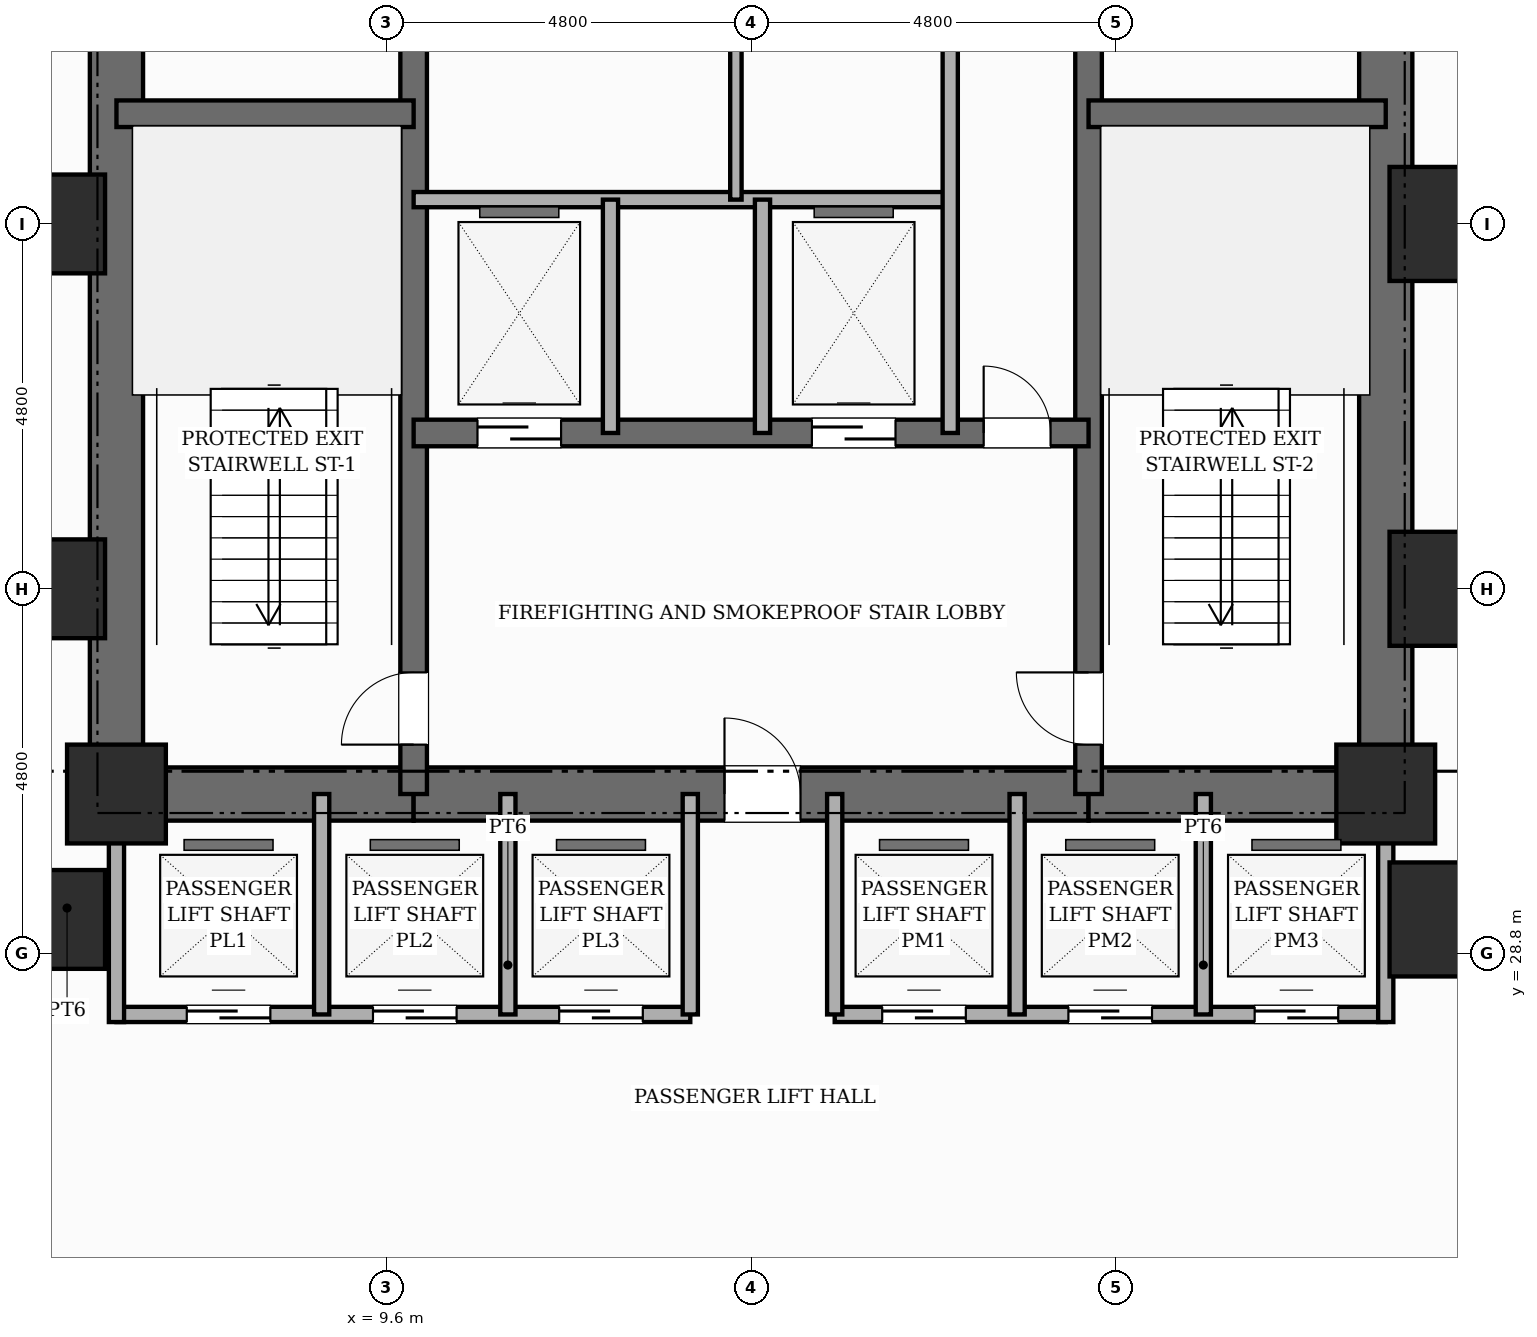
"""IFC4 building model, lengths in metres.
Left out: names, types, materials, properties, quantities, classifications, styles, units other than length and angle.
Written with IfcOpenShell. Run it as: python <this file> out.ifc"""

import sys

from ifc_helpers import new_model, si_unit, direction, frame, frame_2d, origin, origin_2d, place, context, subcontext, project, spatial, rectangle, extrude, element, fill, save


model = new_model("IFC4")
c1 = context("Model", 3, precision=1e-05, world=origin(), true_north=direction((0.0, 1.0)))
c2 = subcontext(c1, "Body", "Model", "MODEL_VIEW")
j1 = project(units=[si_unit("LENGTHUNIT", "METRE"), si_unit("PLANEANGLEUNIT", "RADIAN")], contexts=[c1])
p1 = place(None, origin())
s1 = spatial("IfcSite", under=j1, at=p1, CompositionType="ELEMENT")
p2 = place(p1, origin())
s2 = spatial("IfcBuilding", under=s1, at=p2, CompositionType="ELEMENT")
p3 = place(p2, frame((0.0, 0.0, -13.2)))
s3 = spatial("IfcBuildingStorey", under=s2, at=p3, CompositionType="ELEMENT", Elevation=-13.2)
p4 = place(p3, frame((6.05, 30.55, 0.0), z_axis=(0.0, 0.0, 1.0), x_axis=(0.0, 1.0, 0.0)))
e1 = element("IfcWall", 1, at=p4, inside=s3, PredefinedType="SHEAR", context=c2, shape_type="SweptSolid", body=[
    extrude(rectangle(XDim=15.6, YDim=0.7, at=frame_2d((7.8, 0.0))), origin(), (0.0, 0.0, 1.0), 4.4),
])
p5 = place(p3, frame((22.75, 30.55, 0.0), z_axis=(0.0, 0.0, 1.0), x_axis=(0.0, 1.0, 0.0)))
e2 = element("IfcWall", 2, at=p5, inside=s3, PredefinedType="SHEAR", context=c2, shape_type="SweptSolid", body=[
    extrude(rectangle(XDim=15.6, YDim=0.7, at=frame_2d((7.8, 0.0))), origin(), (0.0, 0.0, 1.0), 4.4),
])
p6 = place(p5, frame((10.8, 0.0, 0.0)))
e3 = element("IfcOpeningElement", 3, at=p6, cuts=e2, PredefinedType="OPENING", context=c2, shape_type="SweptSolid", body=[
    extrude(rectangle(XDim=1.0, YDim=2.15, at=frame_2d((0.5, 1.075))), frame((0.0, 0.36, 0.0), z_axis=(0.0, -1.0, 0.0), x_axis=(1.0, 0.0, 0.0)), (0.0, 0.0, 1.0), 0.72),
])
p7 = place(p3, frame((6.05, 30.9, 0.0), z_axis=(0.0, 0.0, 1.0), x_axis=(1.0, 0.0, 0.0)))
e4 = element("IfcWall", 4, at=p7, inside=s3, PredefinedType="SHEAR", context=c2, shape_type="SweptSolid", body=[
    extrude(rectangle(XDim=3.91, YDim=0.7, at=frame_2d((1.955, 0.0))), origin(), (0.0, 0.0, 1.0), 4.4),
])
p8 = place(p3, frame((9.96, 30.9, 0.0), z_axis=(0.0, 0.0, 1.0), x_axis=(1.0, 0.0, 0.0)))
e5 = element("IfcWall", 5, at=p8, inside=s3, PredefinedType="SHEAR", context=c2, shape_type="SweptSolid", body=[
    extrude(rectangle(XDim=8.88, YDim=0.7, at=frame_2d((4.44, 0.0))), origin(), (0.0, 0.0, 1.0), 4.4),
])
p9 = place(p8, frame((4.09, 0.0, 0.0)))
e6 = element("IfcOpeningElement", 6, at=p9, cuts=e5, PredefinedType="OPENING", context=c2, shape_type="SweptSolid", body=[
    extrude(rectangle(XDim=1.0, YDim=2.15, at=frame_2d((0.5, 1.075))), frame((0.0, 0.36, 0.0), z_axis=(0.0, -1.0, 0.0), x_axis=(1.0, 0.0, 0.0)), (0.0, 0.0, 1.0), 0.72),
])
p10 = place(p3, frame((18.84, 30.9, 0.0), z_axis=(0.0, 0.0, 1.0), x_axis=(1.0, 0.0, 0.0)))
e7 = element("IfcWall", 7, at=p10, inside=s3, PredefinedType="SHEAR", context=c2, shape_type="SweptSolid", body=[
    extrude(rectangle(XDim=3.91, YDim=0.7, at=frame_2d((1.955, 0.0))), origin(), (0.0, 0.0, 1.0), 4.4),
])
p11 = place(p3, frame((9.96, 30.9, 0.0), z_axis=(0.0, 0.0, 1.0), x_axis=(0.0, 1.0, 0.0)))
e8 = element("IfcWall", 8, at=p11, inside=s3, PredefinedType="SHEAR", context=c2, shape_type="SweptSolid", body=[
    extrude(rectangle(XDim=14.9, YDim=0.35, at=frame_2d((7.45, 0.0))), origin(), (0.0, 0.0, 1.0), 4.4),
])
p12 = place(p11, frame((0.65, 0.0, 0.0)))
e9 = element("IfcOpeningElement", 9, at=p12, cuts=e8, PredefinedType="OPENING", context=c2, shape_type="SweptSolid", body=[
    extrude(rectangle(XDim=0.95, YDim=2.1, at=frame_2d((0.475, 1.05))), frame((0.0, 0.185, 0.0), z_axis=(0.0, -1.0, 0.0), x_axis=(1.0, 0.0, 0.0)), (0.0, 0.0, 1.0), 0.37),
])
p13 = place(p11, frame((10.45, 0.0, 0.0)))
e10 = element("IfcOpeningElement", 10, at=p13, cuts=e8, PredefinedType="OPENING", context=c2, shape_type="SweptSolid", body=[
    extrude(rectangle(XDim=1.0, YDim=2.15, at=frame_2d((0.5, 1.075))), frame((0.0, 0.185, 0.0), z_axis=(0.0, -1.0, 0.0), x_axis=(1.0, 0.0, 0.0)), (0.0, 0.0, 1.0), 0.37),
])
p14 = place(p3, frame((18.84, 30.9, 0.0), z_axis=(0.0, 0.0, 1.0), x_axis=(0.0, 1.0, 0.0)))
e11 = element("IfcWall", 11, at=p14, inside=s3, PredefinedType="SHEAR", context=c2, shape_type="SweptSolid", body=[
    extrude(rectangle(XDim=14.9, YDim=0.35, at=frame_2d((7.45, 0.0))), origin(), (0.0, 0.0, 1.0), 4.4),
])
p15 = place(p14, frame((0.65, 0.0, 0.0)))
e12 = element("IfcOpeningElement", 12, at=p15, cuts=e11, PredefinedType="OPENING", context=c2, shape_type="SweptSolid", body=[
    extrude(rectangle(XDim=0.95, YDim=2.1, at=frame_2d((0.475, 1.05))), frame((0.0, 0.185, 0.0), z_axis=(0.0, -1.0, 0.0), x_axis=(1.0, 0.0, 0.0)), (0.0, 0.0, 1.0), 0.37),
])
p16 = place(p14, frame((10.45, 0.0, 0.0)))
e13 = element("IfcOpeningElement", 13, at=p16, cuts=e11, PredefinedType="OPENING", context=c2, shape_type="SweptSolid", body=[
    extrude(rectangle(XDim=1.0, YDim=2.15, at=frame_2d((0.5, 1.075))), frame((0.0, 0.185, 0.0), z_axis=(0.0, -1.0, 0.0), x_axis=(1.0, 0.0, 0.0)), (0.0, 0.0, 1.0), 0.37),
])
for number, where, z_axis, x_axis in (
    (14, (6.05, 39.85, 0.0), (0.0, 0.0, 1.0), (1.0, 0.0, 0.0)),
    (15, (18.84, 39.85, 0.0), (0.0, 0.0, 1.0), (1.0, 0.0, 0.0)),
):
    element("IfcWall", number, at=place(p3, frame(where, z_axis=z_axis, x_axis=x_axis)), inside=s3, PredefinedType="SHEAR", context=c2, shape_type="SweptSolid", body=[
        extrude(rectangle(XDim=3.91, YDim=0.35, at=frame_2d((1.955, 0.0))), origin(), (0.0, 0.0, 1.0), 4.4),
    ])
p17 = place(p3, frame((9.96, 35.65, 0.0), z_axis=(0.0, 0.0, 1.0), x_axis=(1.0, 0.0, 0.0)))
e16 = element("IfcWall", 16, at=p17, inside=s3, PredefinedType="SHEAR", context=c2, shape_type="SweptSolid", body=[
    extrude(rectangle(XDim=8.88, YDim=0.35, at=frame_2d((4.44, 0.0))), origin(), (0.0, 0.0, 1.0), 4.4),
])
p18 = place(p17, frame((0.84, 0.0, 0.0)))
e17 = element("IfcOpeningElement", 17, at=p18, cuts=e16, PredefinedType="OPENING", context=c2, shape_type="SweptSolid", body=[
    extrude(rectangle(XDim=1.1, YDim=2.15, at=frame_2d((0.55, 1.075))), frame((0.0, 0.185, 0.0), z_axis=(0.0, -1.0, 0.0), x_axis=(1.0, 0.0, 0.0)), (0.0, 0.0, 1.0), 0.37),
])
p19 = place(p17, frame((5.24, 0.0, 0.0)))
e18 = element("IfcOpeningElement", 18, at=p19, cuts=e16, PredefinedType="OPENING", context=c2, shape_type="SweptSolid", body=[
    extrude(rectangle(XDim=1.1, YDim=2.15, at=frame_2d((0.55, 1.075))), frame((0.0, 0.185, 0.0), z_axis=(0.0, -1.0, 0.0), x_axis=(1.0, 0.0, 0.0)), (0.0, 0.0, 1.0), 0.37),
])
p20 = place(p17, frame((7.5, 0.0, 0.0)))
e19 = element("IfcOpeningElement", 19, at=p20, cuts=e16, PredefinedType="OPENING", context=c2, shape_type="SweptSolid", body=[
    extrude(rectangle(XDim=0.88, YDim=2.1, at=frame_2d((0.44, 1.05))), frame((0.0, 0.185, 0.0), z_axis=(0.0, -1.0, 0.0), x_axis=(1.0, 0.0, 0.0)), (0.0, 0.0, 1.0), 0.37),
])
for number, where, z_axis, x_axis in (
    (20, (5.25, 29.25, 0.0), (0.0, 0.0, 1.0), (1.0, 0.0, 0.0)),
    (21, (5.25, 33.6, 0.0), (0.0, 0.0, 1.0), (1.0, 0.0, 0.0)),
    (22, (5.25, 38.4, 0.0), (0.0, 0.0, 1.0), (1.0, 0.0, 0.0)),
    (23, (6.05, 30.9, 0.0), (0.0, 0.0, 1.0), (1.0, 0.0, 0.0)),
    (24, (22.75, 30.9, 0.0), (0.0, 0.0, 1.0), (1.0, 0.0, 0.0)),
):
    element("IfcColumn", number, at=place(p3, frame(where, z_axis=z_axis, x_axis=x_axis)), inside=s3, PredefinedType="COLUMN", context=c2, shape_type="SweptSolid", body=[
        extrude(rectangle(XDim=1.3, YDim=1.3, at=origin_2d()), origin(), (0.0, 0.0, 1.0), 4.4),
    ])
for number, where, z_axis, x_axis in (
    (25, (23.55, 29.25, 0.0), (0.0, 0.0, 1.0), (1.0, 0.0, 0.0)),
    (26, (23.55, 33.6, 0.0), (0.0, 0.0, 1.0), (1.0, 0.0, 0.0)),
    (27, (23.55, 38.4, 0.0), (0.0, 0.0, 1.0), (1.0, 0.0, 0.0)),
):
    element("IfcColumn", number, at=place(p3, frame(where, z_axis=z_axis, x_axis=x_axis)), inside=s3, PredefinedType="USERDEFINED", context=c2, shape_type="SweptSolid", body=[
        extrude(rectangle(XDim=1.5, YDim=1.5, at=origin_2d()), origin(), (0.0, 0.0, 1.0), 4.4),
    ])
p21 = place(p3, frame((9.96, 38.72, 0.0), z_axis=(0.0, 0.0, 1.0), x_axis=(1.0, 0.0, 0.0)))
e28 = element("IfcWall", 28, at=p21, inside=s3, PredefinedType="POLYGONAL", context=c2, shape_type="SweptSolid", body=[
    extrude(rectangle(XDim=7.06, YDim=0.2, at=frame_2d((3.53, 0.0))), origin(), (0.0, 0.0, 1.0), 4.08),
])
for number, where, z_axis, x_axis in (
    (29, (12.55, 35.65, 0.0), (0.0, 0.0, 1.0), (0.0, 1.0, 0.0)),
    (30, (14.55, 35.65, 0.0), (0.0, 0.0, 1.0), (0.0, 1.0, 0.0)),
):
    element("IfcWall", number, at=place(p3, frame(where, z_axis=z_axis, x_axis=x_axis)), inside=s3, PredefinedType="POLYGONAL", context=c2, shape_type="SweptSolid", body=[
        extrude(rectangle(XDim=3.07, YDim=0.2, at=frame_2d((1.535, 0.0))), origin(), (0.0, 0.0, 1.0), 4.08),
    ])
p22 = place(p3, frame((17.02, 35.65, 0.0), z_axis=(0.0, 0.0, 1.0), x_axis=(0.0, 1.0, 0.0)))
e31 = element("IfcWall", 31, at=p22, inside=s3, PredefinedType="POLYGONAL", context=c2, shape_type="SweptSolid", body=[
    extrude(rectangle(XDim=5.15, YDim=0.2, at=frame_2d((2.575, 0.0))), origin(), (0.0, 0.0, 1.0), 4.08),
])
p23 = place(p3, frame((14.2, 38.72, 0.0), z_axis=(0.0, 0.0, 1.0), x_axis=(0.0, 1.0, 0.0)))
e32 = element("IfcWall", 32, at=p23, inside=s3, PredefinedType="PARTITIONING", context=c2, shape_type="SweptSolid", body=[
    extrude(rectangle(XDim=2.08, YDim=0.15, at=frame_2d((1.04, 0.0))), origin(), (0.0, 0.0, 1.0), 4.08),
])
p24 = place(p3, frame((6.05, 28.0, 0.0), z_axis=(0.0, 0.0, 1.0), x_axis=(1.0, 0.0, 0.0)))
e33 = element("IfcWall", 33, at=p24, inside=s3, PredefinedType="POLYGONAL", context=c2, shape_type="SweptSolid", body=[
    extrude(rectangle(XDim=7.55, YDim=0.2, at=frame_2d((3.775, 0.0))), origin(), (0.0, 0.0, 1.0), 4.08),
])
p25 = place(p24, frame((0.925, 0.0, 0.0)))
e34 = element("IfcOpeningElement", 34, at=p25, cuts=e33, PredefinedType="OPENING", context=c2, shape_type="SweptSolid", body=[
    extrude(rectangle(XDim=1.1, YDim=2.15, at=frame_2d((0.55, 1.075))), frame((0.0, 0.11, 0.0), z_axis=(0.0, -1.0, 0.0), x_axis=(1.0, 0.0, 0.0)), (0.0, 0.0, 1.0), 0.22),
])
p26 = place(p24, frame((3.375, 0.0, 0.0)))
e35 = element("IfcOpeningElement", 35, at=p26, cuts=e33, PredefinedType="OPENING", context=c2, shape_type="SweptSolid", body=[
    extrude(rectangle(XDim=1.1, YDim=2.15, at=frame_2d((0.55, 1.075))), frame((0.0, 0.11, 0.0), z_axis=(0.0, -1.0, 0.0), x_axis=(1.0, 0.0, 0.0)), (0.0, 0.0, 1.0), 0.22),
])
p27 = place(p24, frame((5.825, 0.0, 0.0)))
e36 = element("IfcOpeningElement", 36, at=p27, cuts=e33, PredefinedType="OPENING", context=c2, shape_type="SweptSolid", body=[
    extrude(rectangle(XDim=1.1, YDim=2.15, at=frame_2d((0.55, 1.075))), frame((0.0, 0.11, 0.0), z_axis=(0.0, -1.0, 0.0), x_axis=(1.0, 0.0, 0.0)), (0.0, 0.0, 1.0), 0.22),
])
p28 = place(p3, frame((15.5, 28.0, 0.0), z_axis=(0.0, 0.0, 1.0), x_axis=(1.0, 0.0, 0.0)))
e37 = element("IfcWall", 37, at=p28, inside=s3, PredefinedType="POLYGONAL", context=c2, shape_type="SweptSolid", body=[
    extrude(rectangle(XDim=7.25, YDim=0.2, at=frame_2d((3.625, 0.0))), origin(), (0.0, 0.0, 1.0), 4.08),
])
p29 = place(p28, frame((0.625, 0.0, 0.0)))
e38 = element("IfcOpeningElement", 38, at=p29, cuts=e37, PredefinedType="OPENING", context=c2, shape_type="SweptSolid", body=[
    extrude(rectangle(XDim=1.1, YDim=2.15, at=frame_2d((0.55, 1.075))), frame((0.0, 0.11, 0.0), z_axis=(0.0, -1.0, 0.0), x_axis=(1.0, 0.0, 0.0)), (0.0, 0.0, 1.0), 0.22),
])
p30 = place(p28, frame((3.075, 0.0, 0.0)))
e39 = element("IfcOpeningElement", 39, at=p30, cuts=e37, PredefinedType="OPENING", context=c2, shape_type="SweptSolid", body=[
    extrude(rectangle(XDim=1.1, YDim=2.15, at=frame_2d((0.55, 1.075))), frame((0.0, 0.11, 0.0), z_axis=(0.0, -1.0, 0.0), x_axis=(1.0, 0.0, 0.0)), (0.0, 0.0, 1.0), 0.22),
])
p31 = place(p28, frame((5.525, 0.0, 0.0)))
e40 = element("IfcOpeningElement", 40, at=p31, cuts=e37, PredefinedType="OPENING", context=c2, shape_type="SweptSolid", body=[
    extrude(rectangle(XDim=1.1, YDim=2.15, at=frame_2d((0.55, 1.075))), frame((0.0, 0.11, 0.0), z_axis=(0.0, -1.0, 0.0), x_axis=(1.0, 0.0, 0.0)), (0.0, 0.0, 1.0), 0.22),
])
for number, where, z_axis, x_axis in (
    (41, (6.05, 27.9, 0.0), (0.0, 0.0, 1.0), (0.0, 1.0, 0.0)),
    (42, (22.75, 27.9, 0.0), (0.0, 0.0, 1.0), (0.0, 1.0, 0.0)),
):
    element("IfcWall", number, at=place(p3, frame(where, z_axis=z_axis, x_axis=x_axis)), inside=s3, PredefinedType="POLYGONAL", context=c2, shape_type="SweptSolid", body=[
        extrude(rectangle(XDim=3.0, YDim=0.2, at=frame_2d((1.5, 0.0))), origin(), (0.0, 0.0, 1.0), 4.08),
    ])
for number, where, z_axis, x_axis in (
    (43, (13.6, 28.0, 0.0), (0.0, 0.0, 1.0), (0.0, 1.0, 0.0)),
    (44, (15.5, 28.0, 0.0), (0.0, 0.0, 1.0), (0.0, 1.0, 0.0)),
    (45, (8.75, 28.0, 0.0), (0.0, 0.0, 1.0), (0.0, 1.0, 0.0)),
    (46, (11.2, 28.0, 0.0), (0.0, 0.0, 1.0), (0.0, 1.0, 0.0)),
    (47, (17.9, 28.0, 0.0), (0.0, 0.0, 1.0), (0.0, 1.0, 0.0)),
    (48, (20.35, 28.0, 0.0), (0.0, 0.0, 1.0), (0.0, 1.0, 0.0)),
):
    element("IfcWall", number, at=place(p3, frame(where, z_axis=z_axis, x_axis=x_axis)), inside=s3, PredefinedType="POLYGONAL", context=c2, shape_type="SweptSolid", body=[
        extrude(rectangle(XDim=2.9, YDim=0.2, at=frame_2d((1.45, 0.0))), origin(), (0.0, 0.0, 1.0), 4.08),
    ])
p32 = place(p12, origin())
e49 = element("IfcDoor", 49, at=p32, inside=s3, OperationType="SINGLE_SWING_LEFT", PredefinedType="DOOR", context=c2, shape_type="SweptSolid", body=[
    extrude(rectangle(XDim=0.95, YDim=2.1, at=frame_2d((0.475, 1.05))), frame((0.0, 0.025, 0.0), z_axis=(0.0, -1.0, 0.0), x_axis=(1.0, 0.0, 0.0)), (0.0, 0.0, 1.0), 0.05),
])
fill(e9, e49)
p33 = place(p15, origin())
e50 = element("IfcDoor", 50, at=p33, inside=s3, OperationType="SINGLE_SWING_RIGHT", PredefinedType="DOOR", context=c2, shape_type="SweptSolid", body=[
    extrude(rectangle(XDim=0.95, YDim=2.1, at=frame_2d((0.475, 1.05))), frame((0.0, 0.025, 0.0), z_axis=(0.0, -1.0, 0.0), x_axis=(1.0, 0.0, 0.0)), (0.0, 0.0, 1.0), 0.05),
])
fill(e12, e50)
p34 = place(p9, origin())
e51 = element("IfcDoor", 51, at=p34, inside=s3, OperationType="SINGLE_SWING_LEFT", PredefinedType="DOOR", context=c2, shape_type="SweptSolid", body=[
    extrude(rectangle(XDim=1.0, YDim=2.15, at=frame_2d((0.5, 1.075))), frame((0.0, 0.025, 0.0), z_axis=(0.0, -1.0, 0.0), x_axis=(1.0, 0.0, 0.0)), (0.0, 0.0, 1.0), 0.05),
])
fill(e6, e51)
p35 = place(p18, origin())
e52 = element("IfcDoor", 52, at=p35, inside=s3, OperationType="SLIDING_TO_LEFT", PredefinedType="DOOR", context=c2, shape_type="SweptSolid", body=[
    extrude(rectangle(XDim=1.1, YDim=2.15, at=frame_2d((0.55, 1.075))), frame((0.0, 0.025, 0.0), z_axis=(0.0, -1.0, 0.0), x_axis=(1.0, 0.0, 0.0)), (0.0, 0.0, 1.0), 0.05),
])
fill(e17, e52)
p36 = place(p19, origin())
e53 = element("IfcDoor", 53, at=p36, inside=s3, OperationType="SLIDING_TO_RIGHT", PredefinedType="DOOR", context=c2, shape_type="SweptSolid", body=[
    extrude(rectangle(XDim=1.1, YDim=2.15, at=frame_2d((0.55, 1.075))), frame((0.0, 0.025, 0.0), z_axis=(0.0, -1.0, 0.0), x_axis=(1.0, 0.0, 0.0)), (0.0, 0.0, 1.0), 0.05),
])
fill(e18, e53)
p37 = place(p20, origin())
e54 = element("IfcDoor", 54, at=p37, inside=s3, OperationType="SINGLE_SWING_LEFT", PredefinedType="DOOR", context=c2, shape_type="SweptSolid", body=[
    extrude(rectangle(XDim=0.88, YDim=2.1, at=frame_2d((0.44, 1.05))), frame((0.0, 0.025, 0.0), z_axis=(0.0, -1.0, 0.0), x_axis=(1.0, 0.0, 0.0)), (0.0, 0.0, 1.0), 0.05),
])
fill(e19, e54)
p38 = place(p25, origin())
e55 = element("IfcDoor", 55, at=p38, inside=s3, OperationType="SLIDING_TO_LEFT", PredefinedType="DOOR", context=c2, shape_type="SweptSolid", body=[
    extrude(rectangle(XDim=1.1, YDim=2.15, at=frame_2d((0.55, 1.075))), frame((0.0, 0.025, 0.0), z_axis=(0.0, -1.0, 0.0), x_axis=(1.0, 0.0, 0.0)), (0.0, 0.0, 1.0), 0.05),
])
fill(e34, e55)
p39 = place(p26, origin())
e56 = element("IfcDoor", 56, at=p39, inside=s3, OperationType="SLIDING_TO_RIGHT", PredefinedType="DOOR", context=c2, shape_type="SweptSolid", body=[
    extrude(rectangle(XDim=1.1, YDim=2.15, at=frame_2d((0.55, 1.075))), frame((0.0, 0.025, 0.0), z_axis=(0.0, -1.0, 0.0), x_axis=(1.0, 0.0, 0.0)), (0.0, 0.0, 1.0), 0.05),
])
fill(e35, e56)
p40 = place(p27, origin())
e57 = element("IfcDoor", 57, at=p40, inside=s3, OperationType="SLIDING_TO_LEFT", PredefinedType="DOOR", context=c2, shape_type="SweptSolid", body=[
    extrude(rectangle(XDim=1.1, YDim=2.15, at=frame_2d((0.55, 1.075))), frame((0.0, 0.025, 0.0), z_axis=(0.0, -1.0, 0.0), x_axis=(1.0, 0.0, 0.0)), (0.0, 0.0, 1.0), 0.05),
])
fill(e36, e57)
p41 = place(p29, origin())
e58 = element("IfcDoor", 58, at=p41, inside=s3, OperationType="SLIDING_TO_RIGHT", PredefinedType="DOOR", context=c2, shape_type="SweptSolid", body=[
    extrude(rectangle(XDim=1.1, YDim=2.15, at=frame_2d((0.55, 1.075))), frame((0.0, 0.025, 0.0), z_axis=(0.0, -1.0, 0.0), x_axis=(1.0, 0.0, 0.0)), (0.0, 0.0, 1.0), 0.05),
])
fill(e38, e58)
p42 = place(p30, origin())
e59 = element("IfcDoor", 59, at=p42, inside=s3, OperationType="SLIDING_TO_LEFT", PredefinedType="DOOR", context=c2, shape_type="SweptSolid", body=[
    extrude(rectangle(XDim=1.1, YDim=2.15, at=frame_2d((0.55, 1.075))), frame((0.0, 0.025, 0.0), z_axis=(0.0, -1.0, 0.0), x_axis=(1.0, 0.0, 0.0)), (0.0, 0.0, 1.0), 0.05),
])
fill(e39, e59)
p43 = place(p31, origin())
e60 = element("IfcDoor", 60, at=p43, inside=s3, OperationType="SLIDING_TO_RIGHT", PredefinedType="DOOR", context=c2, shape_type="SweptSolid", body=[
    extrude(rectangle(XDim=1.1, YDim=2.15, at=frame_2d((0.55, 1.075))), frame((0.0, 0.025, 0.0), z_axis=(0.0, -1.0, 0.0), x_axis=(1.0, 0.0, 0.0)), (0.0, 0.0, 1.0), 0.05),
])
fill(e40, e60)
save(model, sys.argv[1])
